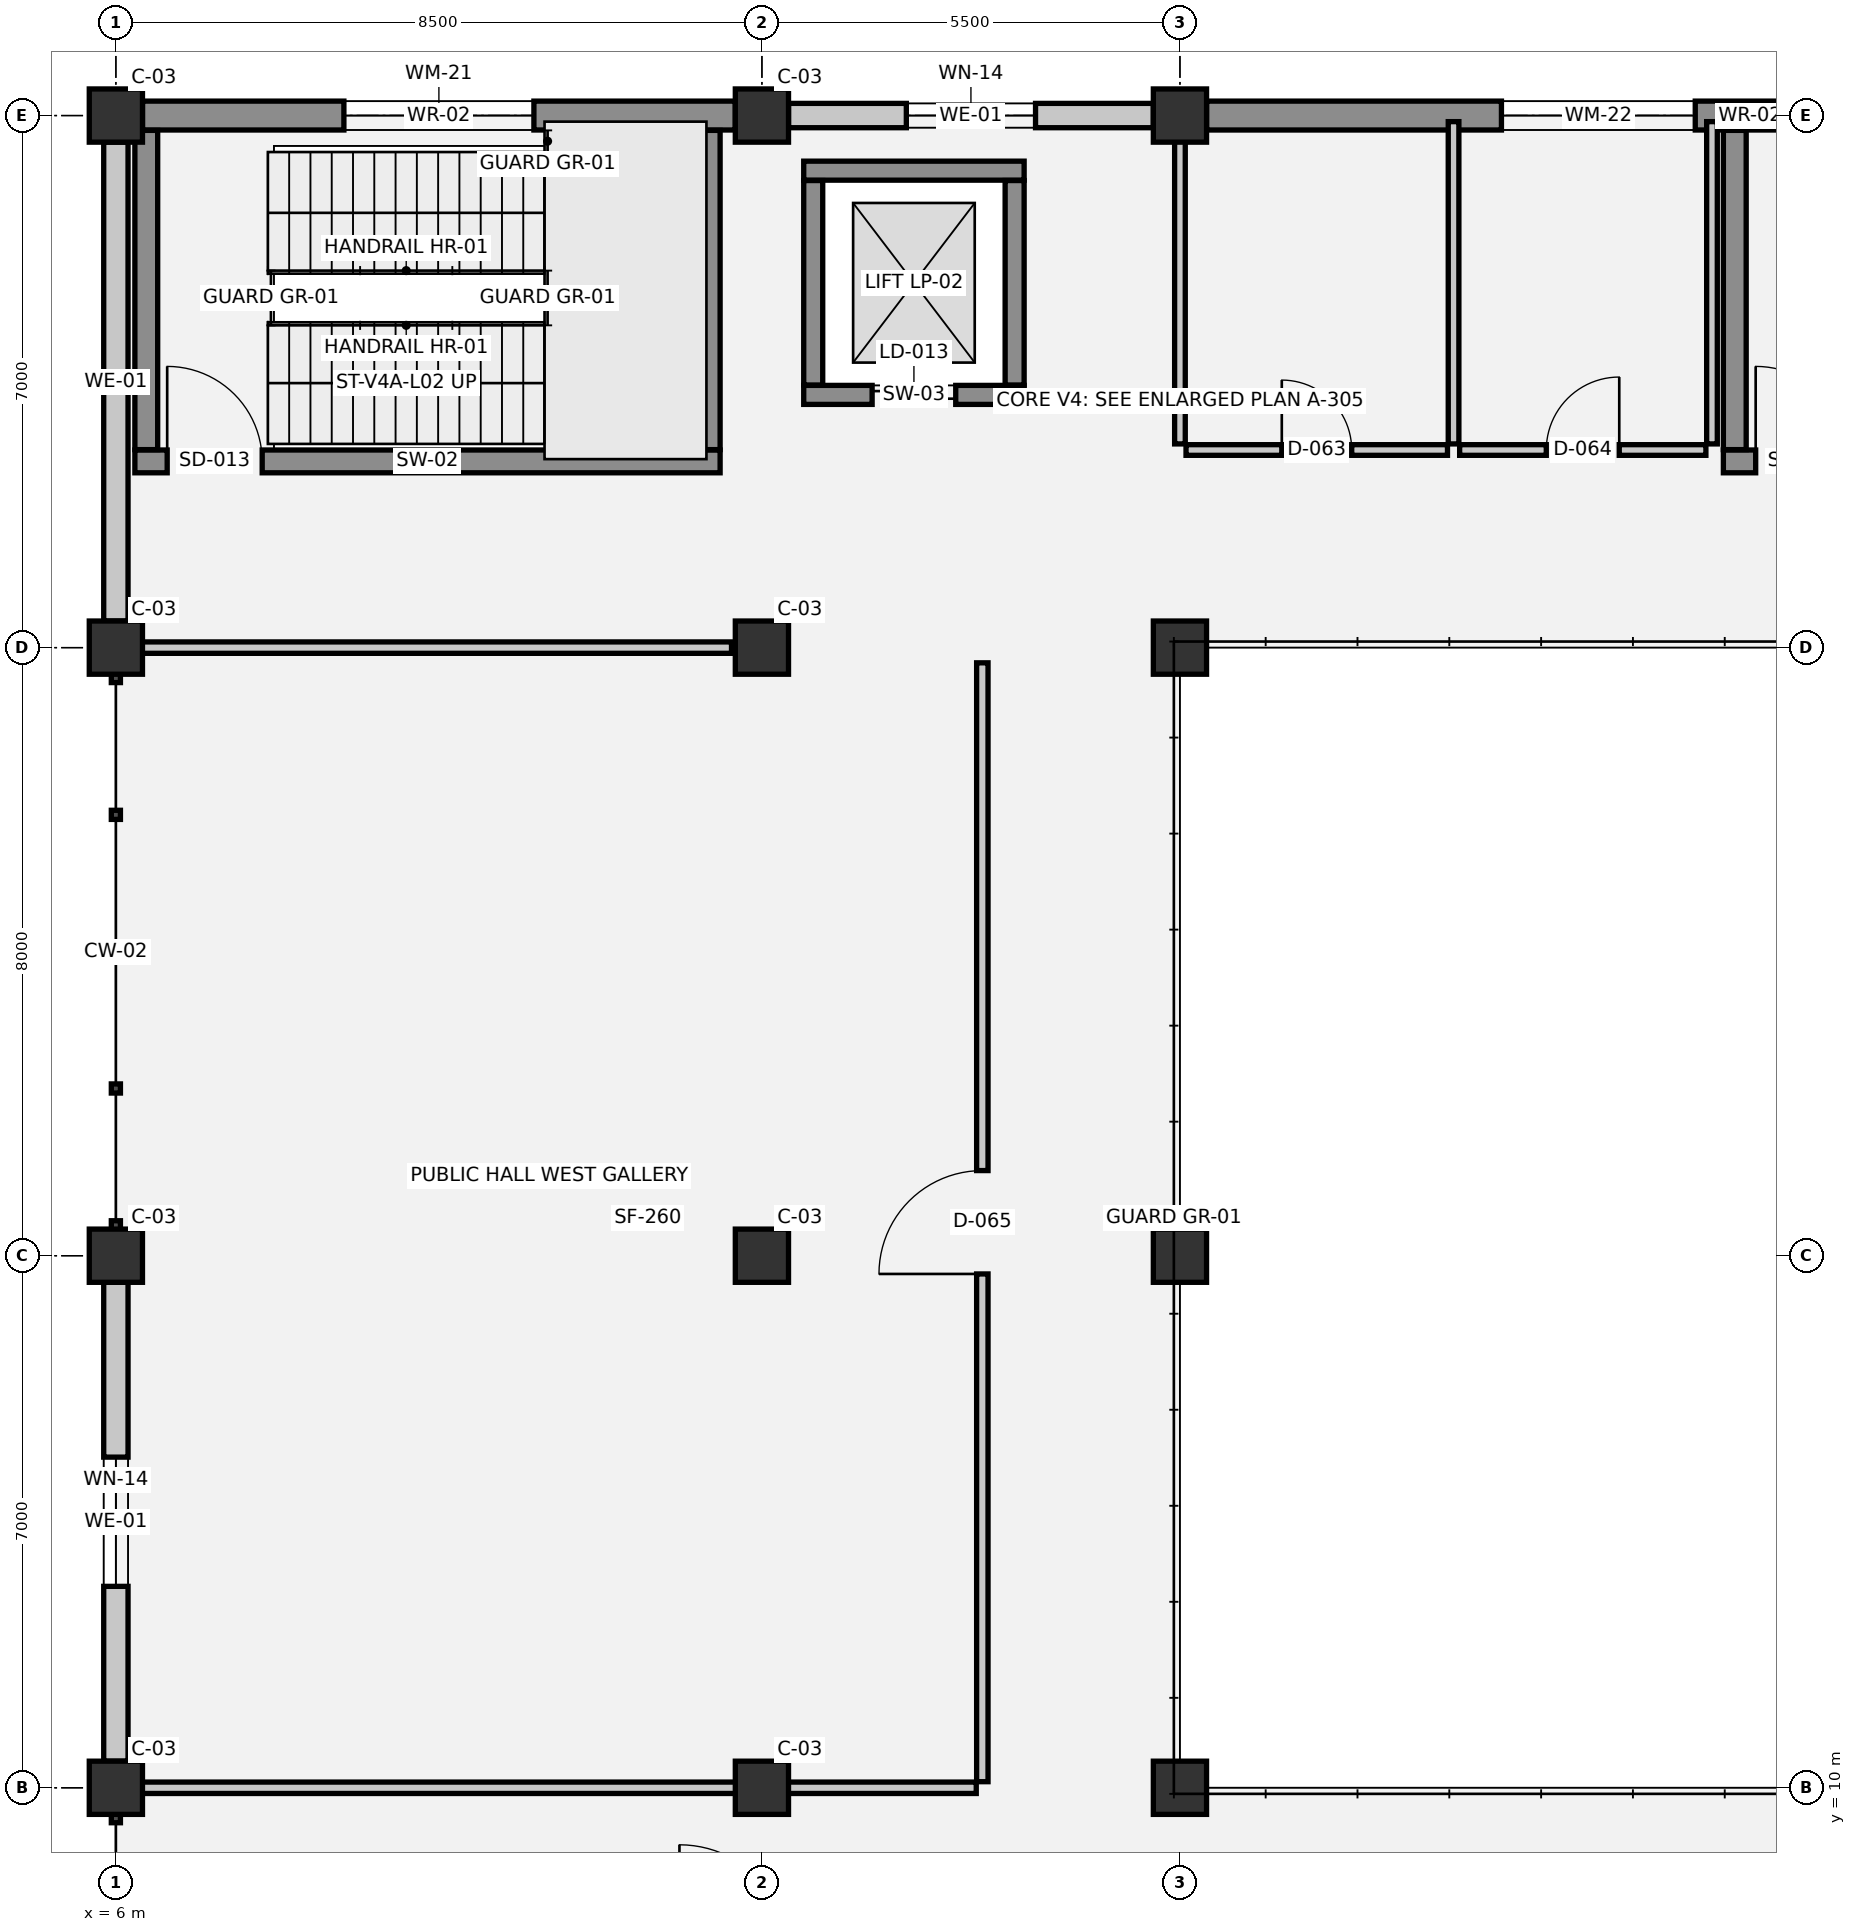
"""IFC4 building model, lengths in metres.
Left out: names, types, materials, properties, quantities, classifications, styles, units other than length and angle.
Written with IfcOpenShell. Run it as: python <this file> out.ifc"""

import sys

from ifc_helpers import new_model, si_unit, direction, frame, frame_2d, origin, origin_2d, place, context, subcontext, project, spatial, rectangle, extrude, element, fill, save


model = new_model("IFC4")
c1 = context("Model", 3, precision=1e-05, world=origin(), true_north=direction((0.0, 1.0)))
c2 = subcontext(c1, "Body", "Model", "MODEL_VIEW")
j1 = project(units=[si_unit("LENGTHUNIT", "METRE"), si_unit("PLANEANGLEUNIT", "RADIAN")], contexts=[c1])
p1 = place(None, origin())
s1 = spatial("IfcSite", under=j1, at=p1, CompositionType="ELEMENT")
p2 = place(p1, origin())
s2 = spatial("IfcBuilding", under=s1, at=p2, CompositionType="ELEMENT")
p3 = place(p2, frame((0.0, 0.0, 5.4)))
s3 = spatial("IfcBuildingStorey", under=s2, at=p3, CompositionType="ELEMENT", Elevation=5.4)
for number, where, z_axis, x_axis in (
    (1, (6.0, 10.0, 0.0), (0.0, 0.0, 1.0), (1.0, 0.0, 0.0)),
    (2, (6.0, 17.0, 0.0), (0.0, 0.0, 1.0), (1.0, 0.0, 0.0)),
    (3, (6.0, 25.0, 0.0), (0.0, 0.0, 1.0), (1.0, 0.0, 0.0)),
    (4, (6.0, 32.0, 0.0), (0.0, 0.0, 1.0), (1.0, 0.0, 0.0)),
    (5, (14.5, 10.0, 0.0), (0.0, 0.0, 1.0), (1.0, 0.0, 0.0)),
    (6, (14.5, 17.0, 0.0), (0.0, 0.0, 1.0), (1.0, 0.0, 0.0)),
    (7, (14.5, 25.0, 0.0), (0.0, 0.0, 1.0), (1.0, 0.0, 0.0)),
    (8, (14.5, 32.0, 0.0), (0.0, 0.0, 1.0), (1.0, 0.0, 0.0)),
    (9, (20.0, 10.0, 0.0), (0.0, 0.0, 1.0), (1.0, 0.0, 0.0)),
    (10, (20.0, 17.0, 0.0), (0.0, 0.0, 1.0), (1.0, 0.0, 0.0)),
    (11, (20.0, 25.0, 0.0), (0.0, 0.0, 1.0), (1.0, 0.0, 0.0)),
    (12, (20.0, 32.0, 0.0), (0.0, 0.0, 1.0), (1.0, 0.0, 0.0)),
):
    element("IfcColumn", number, at=place(p3, frame(where, z_axis=z_axis, x_axis=x_axis)), inside=s3, PredefinedType="COLUMN", context=c2, shape_type="SweptSolid", body=[
        extrude(rectangle(XDim=0.7, YDim=0.7, at=origin_2d()), origin(), (0.0, 0.0, 1.0), 4.5),
    ])
p4 = place(p3, frame((6.0, 10.35, 0.0), z_axis=(0.0, 0.0, 1.0), x_axis=(0.0, 1.0, 0.0)))
e13 = element("IfcWall", 13, at=p4, inside=s3, PredefinedType="SOLIDWALL", context=c2, shape_type="SweptSolid", body=[
    extrude(rectangle(XDim=6.3, YDim=0.32, at=frame_2d((3.15, 0.0))), origin(), (0.0, 0.0, 1.0), 3.26),
])
p5 = place(p4, frame((2.3, 0.0, 0.9)))
e14 = element("IfcOpeningElement", 14, at=p5, cuts=e13, PredefinedType="OPENING", context=c2, shape_type="SweptSolid", body=[
    extrude(rectangle(XDim=1.7, YDim=1.9, at=frame_2d((0.85, 0.95))), frame((0.0, 0.17, 0.0), z_axis=(0.0, -1.0, 0.0), x_axis=(1.0, 0.0, 0.0)), (0.0, 0.0, 1.0), 0.34),
])
p6 = place(p3, frame((6.0, 25.35, 0.0), z_axis=(0.0, 0.0, 1.0), x_axis=(0.0, 1.0, 0.0)))
e15 = element("IfcWall", 15, at=p6, inside=s3, PredefinedType="SOLIDWALL", context=c2, shape_type="SweptSolid", body=[
    extrude(rectangle(XDim=6.3, YDim=0.32, at=frame_2d((3.15, 0.0))), origin(), (0.0, 0.0, 1.0), 3.26),
])
p7 = place(p3, frame((6.35, 32.0, 0.0), z_axis=(0.0, 0.0, 1.0), x_axis=(1.0, 0.0, 0.0)))
e16 = element("IfcWall", 16, at=p7, inside=s3, PredefinedType="STANDARD", context=c2, shape_type="SweptSolid", body=[
    extrude(rectangle(XDim=7.8, YDim=0.38, at=frame_2d((3.9, 0.0))), origin(), (0.0, 0.0, 1.0), 3.26),
])
p8 = place(p7, frame((2.65, 0.0, 0.95)))
e17 = element("IfcOpeningElement", 17, at=p8, cuts=e16, PredefinedType="OPENING", context=c2, shape_type="SweptSolid", body=[
    extrude(rectangle(XDim=2.5, YDim=1.3, at=frame_2d((1.25, 0.65))), frame((0.0, 0.2, 0.0), z_axis=(0.0, -1.0, 0.0), x_axis=(1.0, 0.0, 0.0)), (0.0, 0.0, 1.0), 0.4),
])
p9 = place(p3, frame((14.85, 32.0, 0.0), z_axis=(0.0, 0.0, 1.0), x_axis=(1.0, 0.0, 0.0)))
e18 = element("IfcWall", 18, at=p9, inside=s3, PredefinedType="SOLIDWALL", context=c2, shape_type="SweptSolid", body=[
    extrude(rectangle(XDim=4.8, YDim=0.32, at=frame_2d((2.4, 0.0))), origin(), (0.0, 0.0, 1.0), 3.26),
])
p10 = place(p9, frame((1.55, 0.0, 0.9)))
e19 = element("IfcOpeningElement", 19, at=p10, cuts=e18, PredefinedType="OPENING", context=c2, shape_type="SweptSolid", body=[
    extrude(rectangle(XDim=1.7, YDim=1.9, at=frame_2d((0.85, 0.95))), frame((0.0, 0.17, 0.0), z_axis=(0.0, -1.0, 0.0), x_axis=(1.0, 0.0, 0.0)), (0.0, 0.0, 1.0), 0.34),
])
p11 = place(p3, frame((20.35, 32.0, 0.0), z_axis=(0.0, 0.0, 1.0), x_axis=(1.0, 0.0, 0.0)))
e20 = element("IfcWall", 20, at=p11, inside=s3, PredefinedType="STANDARD", context=c2, shape_type="SweptSolid", body=[
    extrude(rectangle(XDim=14.3, YDim=0.38, at=frame_2d((7.15, 0.0))), origin(), (0.0, 0.0, 1.0), 3.26),
])
p12 = place(p11, frame((3.88, 0.0, 0.95)))
e21 = element("IfcOpeningElement", 21, at=p12, cuts=e20, PredefinedType="OPENING", context=c2, shape_type="SweptSolid", body=[
    extrude(rectangle(XDim=2.55, YDim=1.25, at=frame_2d((1.275, 0.625))), frame((0.0, 0.2, 0.0), z_axis=(0.0, -1.0, 0.0), x_axis=(1.0, 0.0, 0.0)), (0.0, 0.0, 1.0), 0.4),
])
p13 = place(p3, frame((15.05, 28.325, 0.0), z_axis=(0.0, 0.0, 1.0), x_axis=(1.0, 0.0, 0.0)))
e22 = element("IfcWall", 22, at=p13, inside=s3, PredefinedType="SHEAR", context=c2, shape_type="SweptSolid", body=[
    extrude(rectangle(XDim=2.9, YDim=0.25, at=frame_2d((1.45, 0.0))), origin(), (0.0, 0.0, 1.0), 4.5),
])
p14 = place(p13, frame((0.9, 0.0, 0.0)))
e23 = element("IfcOpeningElement", 23, at=p14, cuts=e22, PredefinedType="OPENING", context=c2, shape_type="SweptSolid", body=[
    extrude(rectangle(XDim=1.1, YDim=2.15, at=frame_2d((0.55, 1.075))), frame((0.0, 0.135, 0.0), z_axis=(0.0, -1.0, 0.0), x_axis=(1.0, 0.0, 0.0)), (0.0, 0.0, 1.0), 0.27),
])
p15 = place(p3, frame((17.95, 31.275, 0.0), z_axis=(0.0, 0.0, 1.0), x_axis=(-1.0, 0.0, 0.0)))
e24 = element("IfcWall", 24, at=p15, inside=s3, PredefinedType="SHEAR", context=c2, shape_type="SweptSolid", body=[
    extrude(rectangle(XDim=2.9, YDim=0.25, at=frame_2d((1.45, 0.0))), origin(), (0.0, 0.0, 1.0), 4.5),
])
for number, where, z_axis, x_axis in (
    (25, (15.175, 31.145, 0.0), (0.0, 0.0, 1.0), (0.0, -1.0, 0.0)),
    (26, (17.825, 28.455, 0.0), (0.0, 0.0, 1.0), (0.0, 1.0, 0.0)),
):
    element("IfcWall", number, at=place(p3, frame(where, z_axis=z_axis, x_axis=x_axis)), inside=s3, PredefinedType="SHEAR", context=c2, shape_type="SweptSolid", body=[
        extrude(rectangle(XDim=2.69, YDim=0.25, at=frame_2d((1.345, 0.0))), origin(), (0.0, 0.0, 1.0), 4.5),
    ])
p16 = place(p3, frame((6.25, 27.45, 0.0), z_axis=(0.0, 0.0, 1.0), x_axis=(1.0, 0.0, 0.0)))
e27 = element("IfcWall", 27, at=p16, inside=s3, PredefinedType="SHEAR", context=c2, shape_type="SweptSolid", body=[
    extrude(rectangle(XDim=7.7, YDim=0.3, at=frame_2d((3.85, 0.0))), origin(), (0.0, 0.0, 1.0), 4.24),
])
p17 = place(p16, frame((0.425, 0.0, 0.0)))
e28 = element("IfcOpeningElement", 28, at=p17, cuts=e27, PredefinedType="OPENING", context=c2, shape_type="SweptSolid", body=[
    extrude(rectangle(XDim=1.25, YDim=2.15, at=frame_2d((0.625, 1.075))), frame((0.0, 0.16, 0.0), z_axis=(0.0, -1.0, 0.0), x_axis=(1.0, 0.0, 0.0)), (0.0, 0.0, 1.0), 0.32),
])
for number, where, z_axis, x_axis in (
    (29, (6.4, 31.805, 0.0), (0.0, 0.0, 1.0), (0.0, -1.0, 0.0)),
    (30, (13.8, 27.605, 0.0), (0.0, 0.0, 1.0), (0.0, 1.0, 0.0)),
):
    element("IfcWall", number, at=place(p3, frame(where, z_axis=z_axis, x_axis=x_axis)), inside=s3, PredefinedType="SHEAR", context=c2, shape_type="SweptSolid", body=[
        extrude(rectangle(XDim=4.2, YDim=0.3, at=frame_2d((2.1, 0.0))), origin(), (0.0, 0.0, 1.0), 4.24),
    ])
p18 = place(p3, frame((27.15, 27.45, 0.0), z_axis=(0.0, 0.0, 1.0), x_axis=(1.0, 0.0, 0.0)))
e31 = element("IfcWall", 31, at=p18, inside=s3, PredefinedType="SHEAR", context=c2, shape_type="SweptSolid", body=[
    extrude(rectangle(XDim=7.7, YDim=0.3, at=frame_2d((3.85, 0.0))), origin(), (0.0, 0.0, 1.0), 4.24),
])
p19 = place(p18, frame((0.425, 0.0, 0.0)))
e32 = element("IfcOpeningElement", 32, at=p19, cuts=e31, PredefinedType="OPENING", context=c2, shape_type="SweptSolid", body=[
    extrude(rectangle(XDim=1.25, YDim=2.15, at=frame_2d((0.625, 1.075))), frame((0.0, 0.16, 0.0), z_axis=(0.0, -1.0, 0.0), x_axis=(1.0, 0.0, 0.0)), (0.0, 0.0, 1.0), 0.32),
])
p20 = place(p3, frame((27.3, 31.805, 0.0), z_axis=(0.0, 0.0, 1.0), x_axis=(0.0, -1.0, 0.0)))
e33 = element("IfcWall", 33, at=p20, inside=s3, PredefinedType="SHEAR", context=c2, shape_type="SweptSolid", body=[
    extrude(rectangle(XDim=4.2, YDim=0.3, at=frame_2d((2.1, 0.0))), origin(), (0.0, 0.0, 1.0), 4.24),
])
p21 = place(p3, frame((6.08, 10.0, 0.0), z_axis=(0.0, 0.0, 1.0), x_axis=(1.0, 0.0, 0.0)))
e34 = element("IfcWall", 34, at=p21, inside=s3, PredefinedType="PARTITIONING", context=c2, shape_type="SweptSolid", body=[
    extrude(rectangle(XDim=11.24, YDim=0.15, at=frame_2d((5.62, 0.0))), origin(), (0.0, 0.0, 1.0), 3.53),
])
p22 = place(p3, frame((6.08, 25.0, 0.0), z_axis=(0.0, 0.0, 1.0), x_axis=(1.0, 0.0, 0.0)))
e35 = element("IfcWall", 35, at=p22, inside=s3, PredefinedType="PARTITIONING", context=c2, shape_type="SweptSolid", body=[
    extrude(rectangle(XDim=8.02, YDim=0.15, at=frame_2d((4.01, 0.0))), origin(), (0.0, 0.0, 1.0), 3.53),
])
p23 = place(p3, frame((20.08, 27.6, 0.0), z_axis=(0.0, 0.0, 1.0), x_axis=(1.0, 0.0, 0.0)))
e36 = element("IfcWall", 36, at=p23, inside=s3, PredefinedType="PLUMBINGWALL", context=c2, shape_type="SweptSolid", body=[
    extrude(rectangle(XDim=3.44, YDim=0.14, at=frame_2d((1.72, 0.0))), origin(), (0.0, 0.0, 1.0), 4.14),
])
p24 = place(p23, frame((1.26, 0.0, 0.0)))
e37 = element("IfcOpeningElement", 37, at=p24, cuts=e36, PredefinedType="OPENING", context=c2, shape_type="SweptSolid", body=[
    extrude(rectangle(XDim=0.92, YDim=2.1, at=frame_2d((0.46, 1.05))), frame((0.0, 0.08, 0.0), z_axis=(0.0, -1.0, 0.0), x_axis=(1.0, 0.0, 0.0)), (0.0, 0.0, 1.0), 0.16),
])
p25 = place(p3, frame((23.68, 27.6, 0.0), z_axis=(0.0, 0.0, 1.0), x_axis=(1.0, 0.0, 0.0)))
e38 = element("IfcWall", 38, at=p25, inside=s3, PredefinedType="PLUMBINGWALL", context=c2, shape_type="SweptSolid", body=[
    extrude(rectangle(XDim=3.24, YDim=0.14, at=frame_2d((1.62, 0.0))), origin(), (0.0, 0.0, 1.0), 4.14),
])
p26 = place(p25, frame((1.14, 0.0, 0.0)))
e39 = element("IfcOpeningElement", 39, at=p26, cuts=e38, PredefinedType="OPENING", context=c2, shape_type="SweptSolid", body=[
    extrude(rectangle(XDim=0.96, YDim=2.1, at=frame_2d((0.48, 1.05))), frame((0.0, 0.08, 0.0), z_axis=(0.0, -1.0, 0.0), x_axis=(1.0, 0.0, 0.0)), (0.0, 0.0, 1.0), 0.16),
])
p27 = place(p3, frame((17.4, 10.08, 0.0), z_axis=(0.0, 0.0, 1.0), x_axis=(0.0, 1.0, 0.0)))
e40 = element("IfcWall", 40, at=p27, inside=s3, PredefinedType="PARTITIONING", context=c2, shape_type="SweptSolid", body=[
    extrude(rectangle(XDim=14.72, YDim=0.15, at=frame_2d((7.36, 0.0))), origin(), (0.0, 0.0, 1.0), 4.14),
])
p28 = place(p27, frame((6.68, 0.0, 0.0)))
e41 = element("IfcOpeningElement", 41, at=p28, cuts=e40, PredefinedType="OPENING", context=c2, shape_type="SweptSolid", body=[
    extrude(rectangle(XDim=1.36, YDim=2.2, at=frame_2d((0.68, 1.1))), frame((0.0, 0.085, 0.0), z_axis=(0.0, -1.0, 0.0), x_axis=(1.0, 0.0, 0.0)), (0.0, 0.0, 1.0), 0.17),
])
p29 = place(p3, frame((20.0, 27.68, 0.0), z_axis=(0.0, 0.0, 1.0), x_axis=(0.0, 1.0, 0.0)))
e42 = element("IfcWall", 42, at=p29, inside=s3, PredefinedType="PLUMBINGWALL", context=c2, shape_type="SweptSolid", body=[
    extrude(rectangle(XDim=4.24, YDim=0.14, at=frame_2d((2.12, 0.0))), origin(), (0.0, 0.0, 1.0), 3.68),
])
for number, where, z_axis, x_axis in (
    (43, (23.6, 27.68, 0.0), (0.0, 0.0, 1.0), (0.0, 1.0, 0.0)),
    (44, (27.0, 27.68, 0.0), (0.0, 0.0, 1.0), (0.0, 1.0, 0.0)),
):
    element("IfcWall", number, at=place(p3, frame(where, z_axis=z_axis, x_axis=x_axis)), inside=s3, PredefinedType="PLUMBINGWALL", context=c2, shape_type="SweptSolid", body=[
        extrude(rectangle(XDim=4.24, YDim=0.14, at=frame_2d((2.12, 0.0))), origin(), (0.0, 0.0, 1.0), 4.14),
    ])
p30 = place(p5, origin())
e45 = element("IfcWindow", 45, at=p30, inside=s3, PartitioningType="SINGLE_PANEL", PredefinedType="WINDOW", context=c2, shape_type="SweptSolid", body=[
    extrude(rectangle(XDim=1.7, YDim=1.9, at=frame_2d((0.85, 0.95))), frame((0.0, 0.03, 0.0), z_axis=(0.0, -1.0, 0.0), x_axis=(1.0, 0.0, 0.0)), (0.0, 0.0, 1.0), 0.06),
])
fill(e14, e45)
p31 = place(p10, origin())
e46 = element("IfcWindow", 46, at=p31, inside=s3, PartitioningType="SINGLE_PANEL", PredefinedType="WINDOW", context=c2, shape_type="SweptSolid", body=[
    extrude(rectangle(XDim=1.7, YDim=1.9, at=frame_2d((0.85, 0.95))), frame((0.0, 0.03, 0.0), z_axis=(0.0, -1.0, 0.0), x_axis=(1.0, 0.0, 0.0)), (0.0, 0.0, 1.0), 0.06),
])
fill(e19, e46)
p32 = place(p14, origin())
e47 = element("IfcDoor", 47, at=p32, inside=s3, OperationType="DOUBLE_DOOR_SLIDING", PredefinedType="DOOR", context=c2, shape_type="SweptSolid", body=[
    extrude(rectangle(XDim=1.1, YDim=2.15, at=frame_2d((0.55, 1.075))), frame((0.0, 0.025, 0.0), z_axis=(0.0, -1.0, 0.0), x_axis=(1.0, 0.0, 0.0)), (0.0, 0.0, 1.0), 0.05),
])
fill(e23, e47)
p33 = place(p17, origin())
e48 = element("IfcDoor", 48, at=p33, inside=s3, OperationType="SINGLE_SWING_LEFT", PredefinedType="DOOR", context=c2, shape_type="SweptSolid", body=[
    extrude(rectangle(XDim=1.25, YDim=2.15, at=frame_2d((0.625, 1.075))), frame((0.0, 0.025, 0.0), z_axis=(0.0, -1.0, 0.0), x_axis=(1.0, 0.0, 0.0)), (0.0, 0.0, 1.0), 0.05),
])
fill(e28, e48)
p34 = place(p19, origin())
e49 = element("IfcDoor", 49, at=p34, inside=s3, OperationType="SINGLE_SWING_LEFT", PredefinedType="DOOR", context=c2, shape_type="SweptSolid", body=[
    extrude(rectangle(XDim=1.25, YDim=2.15, at=frame_2d((0.625, 1.075))), frame((0.0, 0.025, 0.0), z_axis=(0.0, -1.0, 0.0), x_axis=(1.0, 0.0, 0.0)), (0.0, 0.0, 1.0), 0.05),
])
fill(e32, e49)
p35 = place(p24, origin())
e50 = element("IfcDoor", 50, at=p35, inside=s3, OperationType="SINGLE_SWING_LEFT", PredefinedType="DOOR", context=c2, shape_type="SweptSolid", body=[
    extrude(rectangle(XDim=0.92, YDim=2.1, at=frame_2d((0.46, 1.05))), frame((0.0, 0.025, 0.0), z_axis=(0.0, -1.0, 0.0), x_axis=(1.0, 0.0, 0.0)), (0.0, 0.0, 1.0), 0.05),
])
fill(e37, e50)
p36 = place(p26, origin())
e51 = element("IfcDoor", 51, at=p36, inside=s3, OperationType="SINGLE_SWING_RIGHT", PredefinedType="DOOR", context=c2, shape_type="SweptSolid", body=[
    extrude(rectangle(XDim=0.96, YDim=2.1, at=frame_2d((0.48, 1.05))), frame((0.0, 0.025, 0.0), z_axis=(0.0, -1.0, 0.0), x_axis=(1.0, 0.0, 0.0)), (0.0, 0.0, 1.0), 0.05),
])
fill(e39, e51)
p37 = place(p28, origin())
e52 = element("IfcDoor", 52, at=p37, inside=s3, OperationType="SINGLE_SWING_LEFT", PredefinedType="DOOR", context=c2, shape_type="SweptSolid", body=[
    extrude(rectangle(XDim=1.36, YDim=2.2, at=frame_2d((0.68, 1.1))), frame((0.0, 0.025, 0.0), z_axis=(0.0, -1.0, 0.0), x_axis=(1.0, 0.0, 0.0)), (0.0, 0.0, 1.0), 0.05),
])
fill(e41, e52)
p38 = place(p8, origin())
e53 = element("IfcWindow", 53, at=p38, inside=s3, PartitioningType="SINGLE_PANEL", PredefinedType="WINDOW", context=c2, shape_type="SweptSolid", body=[
    extrude(rectangle(XDim=2.5, YDim=1.3, at=frame_2d((1.25, 0.65))), frame((0.0, 0.03, 0.0), z_axis=(0.0, -1.0, 0.0), x_axis=(1.0, 0.0, 0.0)), (0.0, 0.0, 1.0), 0.06),
])
fill(e17, e53)
p39 = place(p12, origin())
e54 = element("IfcWindow", 54, at=p39, inside=s3, PartitioningType="SINGLE_PANEL", PredefinedType="WINDOW", context=c2, shape_type="SweptSolid", body=[
    extrude(rectangle(XDim=2.55, YDim=1.25, at=frame_2d((1.275, 0.625))), frame((0.0, 0.03, 0.0), z_axis=(0.0, -1.0, 0.0), x_axis=(1.0, 0.0, 0.0)), (0.0, 0.0, 1.0), 0.06),
])
fill(e21, e54)
save(model, sys.argv[1])
